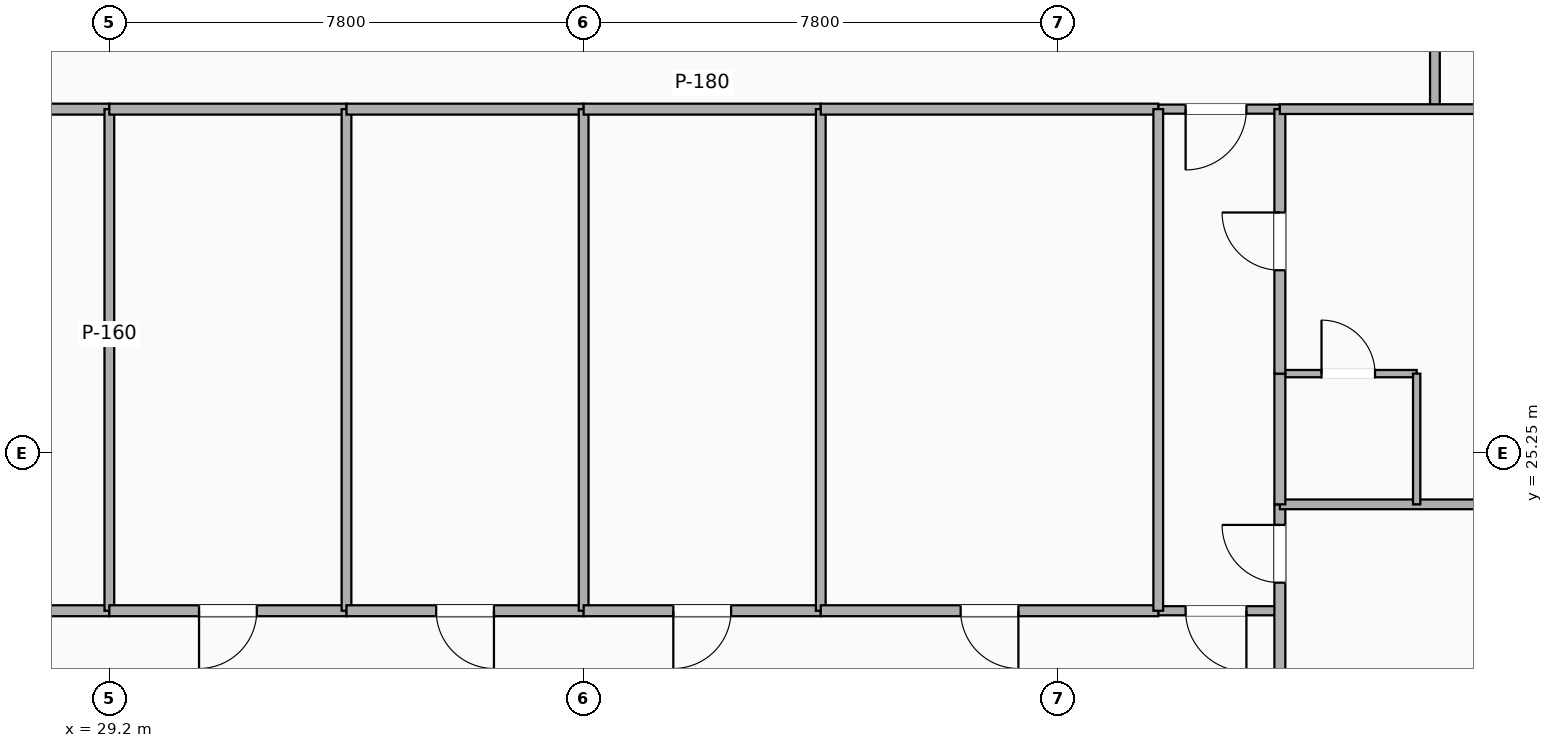
"""IFC4 building model, lengths in metres.
Left out: names, types, materials, properties, quantities, classifications, styles, units other than length and angle.
Written with IfcOpenShell. Run it as: python <this file> out.ifc"""

import sys

from ifc_helpers import new_model, si_unit, direction, frame, frame_2d, origin, place, context, subcontext, project, spatial, rectangle, extrude, element, fill, save


model = new_model("IFC4")
c1 = context("Model", 3, precision=1e-05, world=origin(), true_north=direction((0.0, 1.0)))
c2 = subcontext(c1, "Body", "Model", "MODEL_VIEW")
j1 = project(units=[si_unit("LENGTHUNIT", "METRE"), si_unit("PLANEANGLEUNIT", "RADIAN")], contexts=[c1])
p1 = place(None, origin())
s1 = spatial("IfcSite", under=j1, at=p1, CompositionType="ELEMENT")
p2 = place(p1, origin())
s2 = spatial("IfcBuilding", under=s1, at=p2, CompositionType="ELEMENT")
p3 = place(p2, frame((0.0, 0.0, 50.9)))
s3 = spatial("IfcBuildingStorey", under=s2, at=p3, CompositionType="ELEMENT", Elevation=50.9)
p4 = place(p3, frame((46.45, 22.65, 0.0), z_axis=(0.0, 0.0, 1.0), x_axis=(1.0, 0.0, 0.0)))
e1 = element("IfcWall", 1, at=p4, inside=s3, PredefinedType="PARTITIONING", context=c2, shape_type="SweptSolid", body=[
    extrude(rectangle(XDim=2.0, YDim=0.15, at=frame_2d((1.0, 0.0))), origin(), (0.0, 0.0, 1.0), 3.22),
])
p5 = place(p4, frame((0.45, 0.0, 0.0)))
e2 = element("IfcOpeningElement", 2, at=p5, cuts=e1, PredefinedType="OPENING", context=c2, shape_type="SweptSolid", body=[
    extrude(rectangle(XDim=1.0, YDim=2.15, at=frame_2d((0.5, 1.075))), frame((0.0, 0.085, 0.0), z_axis=(0.0, -1.0, 0.0), x_axis=(1.0, 0.0, 0.0)), (0.0, 0.0, 1.0), 0.17),
])
p6 = place(p3, frame((46.45, 30.9, 0.0), z_axis=(0.0, 0.0, 1.0), x_axis=(1.0, 0.0, 0.0)))
e3 = element("IfcWall", 3, at=p6, inside=s3, PredefinedType="PARTITIONING", context=c2, shape_type="SweptSolid", body=[
    extrude(rectangle(XDim=2.0, YDim=0.15, at=frame_2d((1.0, 0.0))), origin(), (0.0, 0.0, 1.0), 3.22),
])
p7 = place(p6, frame((0.45, 0.0, 0.0)))
e4 = element("IfcOpeningElement", 4, at=p7, cuts=e3, PredefinedType="OPENING", context=c2, shape_type="SweptSolid", body=[
    extrude(rectangle(XDim=1.0, YDim=2.15, at=frame_2d((0.5, 1.075))), frame((0.0, 0.085, 0.0), z_axis=(0.0, -1.0, 0.0), x_axis=(1.0, 0.0, 0.0)), (0.0, 0.0, 1.0), 0.17),
])
p8 = place(p3, frame((51.0, 30.9, 0.0), z_axis=(0.0, 0.0, 1.0), x_axis=(0.0, 1.0, 0.0)))
e5 = element("IfcWall", 5, at=p8, inside=s3, PredefinedType="PARTITIONING", context=c2, shape_type="SweptSolid", body=[
    extrude(rectangle(XDim=2.1, YDim=0.16, at=frame_2d((1.05, 0.0))), origin(), (0.0, 0.0, 1.0), 2.51),
])
p9 = place(p3, frame((18.65, 22.65, 0.0), z_axis=(0.0, 0.0, 1.0), x_axis=(1.0, 0.0, 0.0)))
e6 = element("IfcWall", 6, at=p9, inside=s3, PredefinedType="PARTITIONING", context=c2, shape_type="SweptSolid", body=[
    extrude(rectangle(XDim=10.55, YDim=0.18, at=frame_2d((5.275, 0.0))), origin(), (0.0, 0.0, 1.0), 2.51),
])
p10 = place(p9, frame((4.8, 0.0, 0.0)))
e7 = element("IfcOpeningElement", 7, at=p10, cuts=e6, PredefinedType="OPENING", context=c2, shape_type="SweptSolid", body=[
    extrude(rectangle(XDim=0.95, YDim=2.15, at=frame_2d((0.475, 1.075))), frame((0.0, 0.1, 0.0), z_axis=(0.0, -1.0, 0.0), x_axis=(1.0, 0.0, 0.0)), (0.0, 0.0, 1.0), 0.2),
])
p11 = place(p3, frame((18.65, 30.9, 0.0), z_axis=(0.0, 0.0, 1.0), x_axis=(1.0, 0.0, 0.0)))
e8 = element("IfcWall", 8, at=p11, inside=s3, PredefinedType="PARTITIONING", context=c2, shape_type="SweptSolid", body=[
    extrude(rectangle(XDim=10.55, YDim=0.18, at=frame_2d((5.275, 0.0))), origin(), (0.0, 0.0, 1.0), 2.51),
])
p12 = place(p3, frame((29.2, 22.65, 0.0), z_axis=(0.0, 0.0, 1.0), x_axis=(0.0, 1.0, 0.0)))
e9 = element("IfcWall", 9, at=p12, inside=s3, PredefinedType="PARTITIONING", context=c2, shape_type="SweptSolid", body=[
    extrude(rectangle(XDim=8.25, YDim=0.16, at=frame_2d((4.125, 0.0))), origin(), (0.0, 0.0, 1.0), 2.51),
])
p13 = place(p3, frame((29.2, 22.65, 0.0), z_axis=(0.0, 0.0, 1.0), x_axis=(1.0, 0.0, 0.0)))
e10 = element("IfcWall", 10, at=p13, inside=s3, PredefinedType="PARTITIONING", context=c2, shape_type="SweptSolid", body=[
    extrude(rectangle(XDim=3.9, YDim=0.18, at=frame_2d((1.95, 0.0))), origin(), (0.0, 0.0, 1.0), 2.51),
])
p14 = place(p13, frame((1.475, 0.0, 0.0)))
e11 = element("IfcOpeningElement", 11, at=p14, cuts=e10, PredefinedType="OPENING", context=c2, shape_type="SweptSolid", body=[
    extrude(rectangle(XDim=0.95, YDim=2.15, at=frame_2d((0.475, 1.075))), frame((0.0, 0.1, 0.0), z_axis=(0.0, -1.0, 0.0), x_axis=(1.0, 0.0, 0.0)), (0.0, 0.0, 1.0), 0.2),
])
p15 = place(p3, frame((29.2, 30.9, 0.0), z_axis=(0.0, 0.0, 1.0), x_axis=(1.0, 0.0, 0.0)))
e12 = element("IfcWall", 12, at=p15, inside=s3, PredefinedType="PARTITIONING", context=c2, shape_type="SweptSolid", body=[
    extrude(rectangle(XDim=3.9, YDim=0.18, at=frame_2d((1.95, 0.0))), origin(), (0.0, 0.0, 1.0), 2.51),
])
p16 = place(p3, frame((33.1, 22.65, 0.0), z_axis=(0.0, 0.0, 1.0), x_axis=(0.0, 1.0, 0.0)))
e13 = element("IfcWall", 13, at=p16, inside=s3, PredefinedType="PARTITIONING", context=c2, shape_type="SweptSolid", body=[
    extrude(rectangle(XDim=8.25, YDim=0.16, at=frame_2d((4.125, 0.0))), origin(), (0.0, 0.0, 1.0), 2.788),
])
p17 = place(p3, frame((33.1, 22.65, 0.0), z_axis=(0.0, 0.0, 1.0), x_axis=(1.0, 0.0, 0.0)))
e14 = element("IfcWall", 14, at=p17, inside=s3, PredefinedType="PARTITIONING", context=c2, shape_type="SweptSolid", body=[
    extrude(rectangle(XDim=3.9, YDim=0.18, at=frame_2d((1.95, 0.0))), origin(), (0.0, 0.0, 1.0), 2.51),
])
p18 = place(p17, frame((1.475, 0.0, 0.0)))
e15 = element("IfcOpeningElement", 15, at=p18, cuts=e14, PredefinedType="OPENING", context=c2, shape_type="SweptSolid", body=[
    extrude(rectangle(XDim=0.95, YDim=2.15, at=frame_2d((0.475, 1.075))), frame((0.0, 0.1, 0.0), z_axis=(0.0, -1.0, 0.0), x_axis=(1.0, 0.0, 0.0)), (0.0, 0.0, 1.0), 0.2),
])
p19 = place(p3, frame((33.1, 30.9, 0.0), z_axis=(0.0, 0.0, 1.0), x_axis=(1.0, 0.0, 0.0)))
e16 = element("IfcWall", 16, at=p19, inside=s3, PredefinedType="PARTITIONING", context=c2, shape_type="SweptSolid", body=[
    extrude(rectangle(XDim=3.9, YDim=0.18, at=frame_2d((1.95, 0.0))), origin(), (0.0, 0.0, 1.0), 2.51),
])
p20 = place(p3, frame((37.0, 22.65, 0.0), z_axis=(0.0, 0.0, 1.0), x_axis=(0.0, 1.0, 0.0)))
e17 = element("IfcWall", 17, at=p20, inside=s3, PredefinedType="PARTITIONING", context=c2, shape_type="SweptSolid", body=[
    extrude(rectangle(XDim=8.25, YDim=0.16, at=frame_2d((4.125, 0.0))), origin(), (0.0, 0.0, 1.0), 2.51),
])
p21 = place(p3, frame((37.0, 22.65, 0.0), z_axis=(0.0, 0.0, 1.0), x_axis=(1.0, 0.0, 0.0)))
e18 = element("IfcWall", 18, at=p21, inside=s3, PredefinedType="PARTITIONING", context=c2, shape_type="SweptSolid", body=[
    extrude(rectangle(XDim=3.9, YDim=0.18, at=frame_2d((1.95, 0.0))), origin(), (0.0, 0.0, 1.0), 2.51),
])
p22 = place(p21, frame((1.475, 0.0, 0.0)))
e19 = element("IfcOpeningElement", 19, at=p22, cuts=e18, PredefinedType="OPENING", context=c2, shape_type="SweptSolid", body=[
    extrude(rectangle(XDim=0.95, YDim=2.15, at=frame_2d((0.475, 1.075))), frame((0.0, 0.1, 0.0), z_axis=(0.0, -1.0, 0.0), x_axis=(1.0, 0.0, 0.0)), (0.0, 0.0, 1.0), 0.2),
])
p23 = place(p3, frame((37.0, 30.9, 0.0), z_axis=(0.0, 0.0, 1.0), x_axis=(1.0, 0.0, 0.0)))
e20 = element("IfcWall", 20, at=p23, inside=s3, PredefinedType="PARTITIONING", context=c2, shape_type="SweptSolid", body=[
    extrude(rectangle(XDim=3.9, YDim=0.18, at=frame_2d((1.95, 0.0))), origin(), (0.0, 0.0, 1.0), 2.51),
])
p24 = place(p3, frame((40.9, 22.65, 0.0), z_axis=(0.0, 0.0, 1.0), x_axis=(0.0, 1.0, 0.0)))
e21 = element("IfcWall", 21, at=p24, inside=s3, PredefinedType="PARTITIONING", context=c2, shape_type="SweptSolid", body=[
    extrude(rectangle(XDim=8.25, YDim=0.16, at=frame_2d((4.125, 0.0))), origin(), (0.0, 0.0, 1.0), 2.788),
])
p25 = place(p3, frame((40.9, 22.65, 0.0), z_axis=(0.0, 0.0, 1.0), x_axis=(1.0, 0.0, 0.0)))
e22 = element("IfcWall", 22, at=p25, inside=s3, PredefinedType="PARTITIONING", context=c2, shape_type="SweptSolid", body=[
    extrude(rectangle(XDim=5.55, YDim=0.18, at=frame_2d((2.775, 0.0))), origin(), (0.0, 0.0, 1.0), 2.51),
])
p26 = place(p25, frame((2.3, 0.0, 0.0)))
e23 = element("IfcOpeningElement", 23, at=p26, cuts=e22, PredefinedType="OPENING", context=c2, shape_type="SweptSolid", body=[
    extrude(rectangle(XDim=0.95, YDim=2.15, at=frame_2d((0.475, 1.075))), frame((0.0, 0.1, 0.0), z_axis=(0.0, -1.0, 0.0), x_axis=(1.0, 0.0, 0.0)), (0.0, 0.0, 1.0), 0.2),
])
p27 = place(p3, frame((40.9, 30.9, 0.0), z_axis=(0.0, 0.0, 1.0), x_axis=(1.0, 0.0, 0.0)))
e24 = element("IfcWall", 24, at=p27, inside=s3, PredefinedType="PARTITIONING", context=c2, shape_type="SweptSolid", body=[
    extrude(rectangle(XDim=5.55, YDim=0.18, at=frame_2d((2.775, 0.0))), origin(), (0.0, 0.0, 1.0), 2.51),
])
p28 = place(p3, frame((46.45, 22.65, 0.0), z_axis=(0.0, 0.0, 1.0), x_axis=(0.0, 1.0, 0.0)))
e25 = element("IfcWall", 25, at=p28, inside=s3, PredefinedType="PARTITIONING", context=c2, shape_type="SweptSolid", body=[
    extrude(rectangle(XDim=8.25, YDim=0.16, at=frame_2d((4.125, 0.0))), origin(), (0.0, 0.0, 1.0), 2.788),
])
p29 = place(p3, frame((48.45, 20.05, 0.0), z_axis=(0.0, 0.0, 1.0), x_axis=(0.0, 1.0, 0.0)))
e26 = element("IfcWall", 26, at=p29, inside=s3, PredefinedType="PARTITIONING", context=c2, shape_type="SweptSolid", body=[
    extrude(rectangle(XDim=4.35, YDim=0.18, at=frame_2d((2.175, 0.0))), origin(), (0.0, 0.0, 1.0), 2.51),
])
p30 = place(p29, frame((4.011, 0.0, 0.0), z_axis=(0.0, 0.0, 1.0), x_axis=(-1.0, 0.0, 0.0)))
e27 = element("IfcOpeningElement", 27, at=p30, cuts=e26, PredefinedType="OPENING", context=c2, shape_type="SweptSolid", body=[
    extrude(rectangle(XDim=0.95, YDim=2.15, at=frame_2d((0.475, 1.075))), frame((0.0, 0.1, 0.0), z_axis=(0.0, -1.0, 0.0), x_axis=(1.0, 0.0, 0.0)), (0.0, 0.0, 1.0), 0.2),
])
p31 = place(p3, frame((48.45, 24.4, 0.0), z_axis=(0.0, 0.0, 1.0), x_axis=(1.0, 0.0, 0.0)))
e28 = element("IfcWall", 28, at=p31, inside=s3, PredefinedType="PARTITIONING", context=c2, shape_type="SweptSolid", body=[
    extrude(rectangle(XDim=13.23, YDim=0.16, at=frame_2d((6.615, 0.0))), origin(), (0.0, 0.0, 1.0), 2.583),
])
p32 = place(p3, frame((48.45, 26.55, 0.0), z_axis=(0.0, 0.0, 1.0), x_axis=(1.0, 0.0, 0.0)))
e29 = element("IfcWall", 29, at=p32, inside=s3, PredefinedType="PARTITIONING", context=c2, shape_type="SweptSolid", body=[
    extrude(rectangle(XDim=2.25, YDim=0.12, at=frame_2d((1.125, 0.0))), origin(), (0.0, 0.0, 1.0), 3.22),
])
p33 = place(p32, frame((1.565, 0.0, 0.0), z_axis=(0.0, 0.0, 1.0), x_axis=(-1.0, 0.0, 0.0)))
e30 = element("IfcOpeningElement", 30, at=p33, cuts=e29, PredefinedType="OPENING", context=c2, shape_type="SweptSolid", body=[
    extrude(rectangle(XDim=0.88, YDim=2.08, at=frame_2d((0.44, 1.04))), frame((0.0, 0.07, 0.0), z_axis=(0.0, -1.0, 0.0), x_axis=(1.0, 0.0, 0.0)), (0.0, 0.0, 1.0), 0.14),
])
p34 = place(p3, frame((50.7, 24.4, 0.0), z_axis=(0.0, 0.0, 1.0), x_axis=(0.0, 1.0, 0.0)))
e31 = element("IfcWall", 31, at=p34, inside=s3, PredefinedType="PARTITIONING", context=c2, shape_type="SweptSolid", body=[
    extrude(rectangle(XDim=2.15, YDim=0.12, at=frame_2d((1.075, 0.0))), origin(), (0.0, 0.0, 1.0), 2.788),
])
p35 = place(p3, frame((48.45, 24.4, 0.0), z_axis=(0.0, 0.0, 1.0), x_axis=(0.0, 1.0, 0.0)))
e32 = element("IfcWall", 32, at=p35, inside=s3, PredefinedType="PARTITIONING", context=c2, shape_type="SweptSolid", body=[
    extrude(rectangle(XDim=2.15, YDim=0.18, at=frame_2d((1.075, 0.0))), origin(), (0.0, 0.0, 1.0), 2.788),
])
p36 = place(p3, frame((48.45, 26.55, 0.0), z_axis=(0.0, 0.0, 1.0), x_axis=(0.0, 1.0, 0.0)))
e33 = element("IfcWall", 33, at=p36, inside=s3, PredefinedType="PARTITIONING", context=c2, shape_type="SweptSolid", body=[
    extrude(rectangle(XDim=4.35, YDim=0.18, at=frame_2d((2.175, 0.0))), origin(), (0.0, 0.0, 1.0), 2.788),
])
p37 = place(p36, frame((2.65, 0.0, 0.0), z_axis=(0.0, 0.0, 1.0), x_axis=(-1.0, 0.0, 0.0)))
e34 = element("IfcOpeningElement", 34, at=p37, cuts=e33, PredefinedType="OPENING", context=c2, shape_type="SweptSolid", body=[
    extrude(rectangle(XDim=0.95, YDim=2.15, at=frame_2d((0.475, 1.075))), frame((0.0, 0.1, 0.0), z_axis=(0.0, -1.0, 0.0), x_axis=(1.0, 0.0, 0.0)), (0.0, 0.0, 1.0), 0.2),
])
p38 = place(p3, frame((48.45, 30.9, 0.0), z_axis=(0.0, 0.0, 1.0), x_axis=(1.0, 0.0, 0.0)))
e35 = element("IfcWall", 35, at=p38, inside=s3, PredefinedType="PARTITIONING", context=c2, shape_type="SweptSolid", body=[
    extrude(rectangle(XDim=13.23, YDim=0.16, at=frame_2d((6.615, 0.0))), origin(), (0.0, 0.0, 1.0), 2.583),
])
p39 = place(p5, origin())
e36 = element("IfcDoor", 36, at=p39, inside=s3, OperationType="SINGLE_SWING_RIGHT", PredefinedType="DOOR", context=c2, shape_type="SweptSolid", body=[
    extrude(rectangle(XDim=1.0, YDim=2.15, at=frame_2d((0.5, 1.075))), frame((0.0, 0.025, 0.0), z_axis=(0.0, -1.0, 0.0), x_axis=(1.0, 0.0, 0.0)), (0.0, 0.0, 1.0), 0.05),
])
fill(e2, e36)
p40 = place(p7, origin())
e37 = element("IfcDoor", 37, at=p40, inside=s3, OperationType="SINGLE_SWING_LEFT", PredefinedType="DOOR", context=c2, shape_type="SweptSolid", body=[
    extrude(rectangle(XDim=1.0, YDim=2.15, at=frame_2d((0.5, 1.075))), frame((0.0, 0.025, 0.0), z_axis=(0.0, -1.0, 0.0), x_axis=(1.0, 0.0, 0.0)), (0.0, 0.0, 1.0), 0.05),
])
fill(e4, e37)
p41 = place(p14, origin())
e38 = element("IfcDoor", 38, at=p41, inside=s3, OperationType="SINGLE_SWING_LEFT", PredefinedType="DOOR", context=c2, shape_type="SweptSolid", body=[
    extrude(rectangle(XDim=0.95, YDim=2.15, at=frame_2d((0.475, 1.075))), frame((0.0, 0.025, 0.0), z_axis=(0.0, -1.0, 0.0), x_axis=(1.0, 0.0, 0.0)), (0.0, 0.0, 1.0), 0.05),
])
fill(e11, e38)
p42 = place(p18, origin())
e39 = element("IfcDoor", 39, at=p42, inside=s3, OperationType="SINGLE_SWING_RIGHT", PredefinedType="DOOR", context=c2, shape_type="SweptSolid", body=[
    extrude(rectangle(XDim=0.95, YDim=2.15, at=frame_2d((0.475, 1.075))), frame((0.0, 0.025, 0.0), z_axis=(0.0, -1.0, 0.0), x_axis=(1.0, 0.0, 0.0)), (0.0, 0.0, 1.0), 0.05),
])
fill(e15, e39)
p43 = place(p22, origin())
e40 = element("IfcDoor", 40, at=p43, inside=s3, OperationType="SINGLE_SWING_LEFT", PredefinedType="DOOR", context=c2, shape_type="SweptSolid", body=[
    extrude(rectangle(XDim=0.95, YDim=2.15, at=frame_2d((0.475, 1.075))), frame((0.0, 0.025, 0.0), z_axis=(0.0, -1.0, 0.0), x_axis=(1.0, 0.0, 0.0)), (0.0, 0.0, 1.0), 0.05),
])
fill(e19, e40)
p44 = place(p26, origin())
e41 = element("IfcDoor", 41, at=p44, inside=s3, OperationType="SINGLE_SWING_RIGHT", PredefinedType="DOOR", context=c2, shape_type="SweptSolid", body=[
    extrude(rectangle(XDim=0.95, YDim=2.15, at=frame_2d((0.475, 1.075))), frame((0.0, 0.025, 0.0), z_axis=(0.0, -1.0, 0.0), x_axis=(1.0, 0.0, 0.0)), (0.0, 0.0, 1.0), 0.05),
])
fill(e23, e41)
p45 = place(p30, origin())
e42 = element("IfcDoor", 42, at=p45, inside=s3, OperationType="SINGLE_SWING_RIGHT", PredefinedType="DOOR", context=c2, shape_type="SweptSolid", body=[
    extrude(rectangle(XDim=0.95, YDim=2.15, at=frame_2d((0.475, 1.075))), frame((0.0, 0.025, 0.0), z_axis=(0.0, -1.0, 0.0), x_axis=(1.0, 0.0, 0.0)), (0.0, 0.0, 1.0), 0.05),
])
fill(e27, e42)
p46 = place(p33, origin())
e43 = element("IfcDoor", 43, at=p46, inside=s3, OperationType="SINGLE_SWING_LEFT", PredefinedType="DOOR", context=c2, shape_type="SweptSolid", body=[
    extrude(rectangle(XDim=0.88, YDim=2.08, at=frame_2d((0.44, 1.04))), frame((0.0, 0.025, 0.0), z_axis=(0.0, -1.0, 0.0), x_axis=(1.0, 0.0, 0.0)), (0.0, 0.0, 1.0), 0.05),
])
fill(e30, e43)
p47 = place(p37, origin())
e44 = element("IfcDoor", 44, at=p47, inside=s3, OperationType="SINGLE_SWING_RIGHT", PredefinedType="DOOR", context=c2, shape_type="SweptSolid", body=[
    extrude(rectangle(XDim=0.95, YDim=2.15, at=frame_2d((0.475, 1.075))), frame((0.0, 0.025, 0.0), z_axis=(0.0, -1.0, 0.0), x_axis=(1.0, 0.0, 0.0)), (0.0, 0.0, 1.0), 0.05),
])
fill(e34, e44)
save(model, sys.argv[1])
